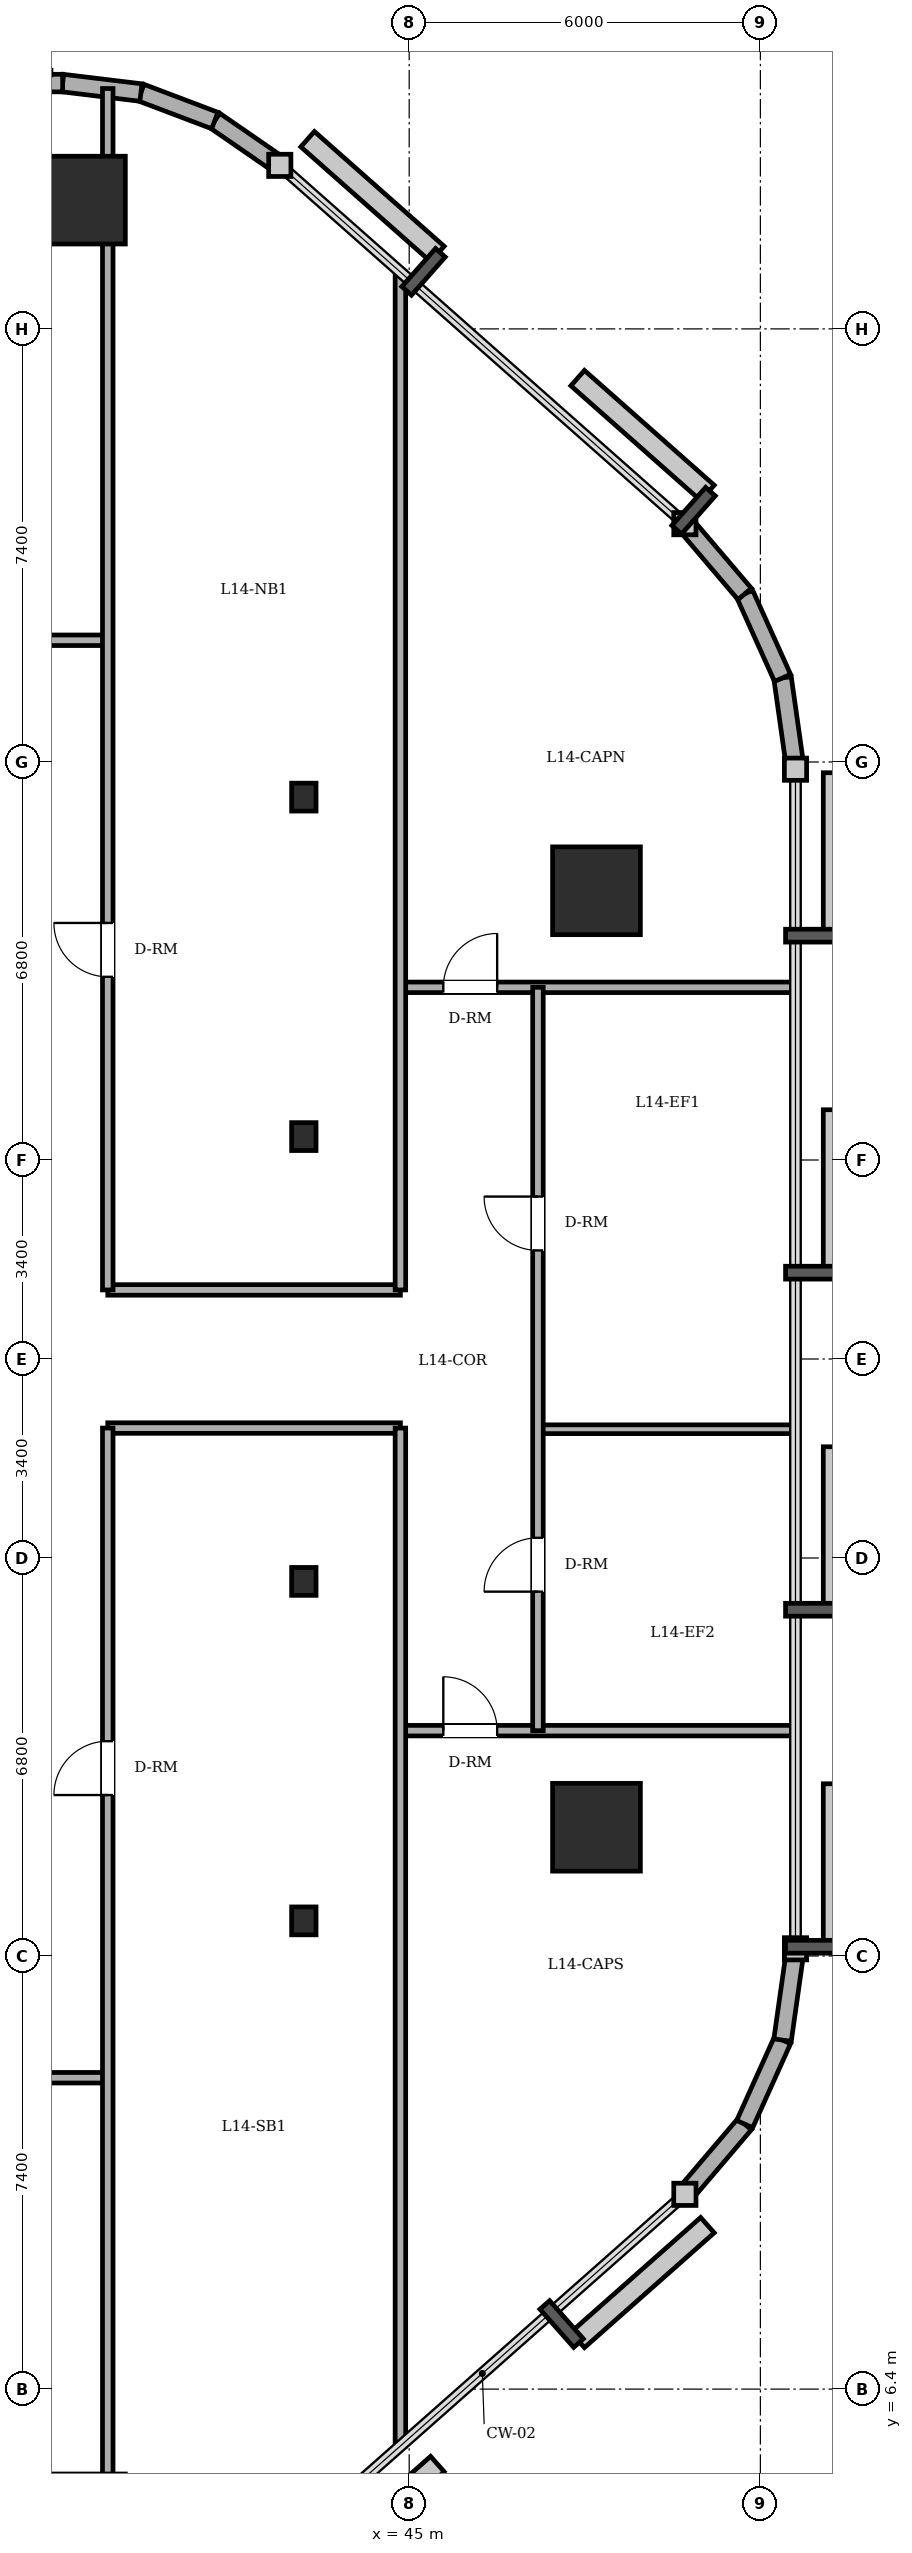
"""IFC4 building model, lengths in metres.
Left out: names, types, materials, properties, quantities, classifications, styles, units other than length and angle.
Written with IfcOpenShell. Run it as: python <this file> out.ifc"""

import sys

from ifc_helpers import new_model, si_unit, direction, frame, frame_2d, origin, origin_2d, place, context, subcontext, project, spatial, rectangle, circle, i_section, extrude, element, fill, save


model = new_model("IFC4")
c1 = context("Model", 3, precision=1e-05, world=origin(), true_north=direction((0.0, 1.0)))
c2 = subcontext(c1, "Body", "Model", "MODEL_VIEW")
j1 = project(units=[si_unit("LENGTHUNIT", "METRE"), si_unit("PLANEANGLEUNIT", "RADIAN")], contexts=[c1])
p1 = place(None, origin())
s1 = spatial("IfcSite", under=j1, at=p1, CompositionType="ELEMENT")
p2 = place(p1, origin())
s2 = spatial("IfcBuilding", under=s1, at=p2, CompositionType="ELEMENT")
p3 = place(p2, frame((0.0, 0.0, 54.0)))
s3 = spatial("IfcBuildingStorey", under=s2, at=p3, CompositionType="ELEMENT", Elevation=54.0)
for number, where, z_axis, x_axis in (
    (1, (48.2, 16.0, 0.0), (0.0, 0.0, 1.0), (1.0, 0.0, 0.0)),
    (2, (48.2, 32.0, 0.0), (0.0, 0.0, 1.0), (1.0, 0.0, 0.0)),
    (3, (39.4, 43.8, 0.0), (0.0, 0.0, 1.0), (1.0, 0.0, 0.0)),
):
    element("IfcColumn", number, at=place(p3, frame(where, z_axis=z_axis, x_axis=x_axis)), inside=s3, PredefinedType="COLUMN", context=c2, shape_type="SweptSolid", body=[
        extrude(circle(Radius=0.75, at=origin_2d()), origin(), (0.0, 0.0, 1.0), 3.6),
    ])
for number, where, z_axis, x_axis in (
    (4, (43.2, 14.4, 0.0), (0.0, 0.0, 1.0), (1.0, 0.0, 0.0)),
    (5, (43.2, 20.2, 0.0), (0.0, 0.0, 1.0), (1.0, 0.0, 0.0)),
    (6, (43.2, 27.8, 0.0), (0.0, 0.0, 1.0), (1.0, 0.0, 0.0)),
    (7, (43.2, 33.6, 0.0), (0.0, 0.0, 1.0), (1.0, 0.0, 0.0)),
):
    element("IfcColumn", number, at=place(p3, frame(where, z_axis=z_axis, x_axis=x_axis)), inside=s3, PredefinedType="COLUMN", context=c2, shape_type="SweptSolid", body=[
        extrude(i_section(OverallWidth=0.417, OverallDepth=0.477, WebThickness=0.036, FlangeThickness=0.057, FilletRadius=0.015, at=origin_2d()), origin(), (0.0, 0.0, 1.0), 3.6),
    ])
p4 = place(p3, frame((49.71, 9.728, 0.0), z_axis=(0.0, 0.0, 1.0), x_axis=(0.648389989909, 0.7613083613, 0.0)))
e8 = element("IfcWall", 8, at=p4, inside=s3, PredefinedType="SOLIDWALL", context=c2, shape_type="SweptSolid", body=[
    extrude(rectangle(XDim=1.576, YDim=0.3, at=frame_2d((0.788, 0.0))), origin(), (0.0, 0.0, 1.0), 3.4),
])
p5 = place(p3, frame((50.732, 10.928, 0.0), z_axis=(0.0, 0.0, 1.0), x_axis=(0.410996558744, 0.911636895206, 0.0)))
e9 = element("IfcWall", 9, at=p5, inside=s3, PredefinedType="SOLIDWALL", context=c2, shape_type="SweptSolid", body=[
    extrude(rectangle(XDim=1.574, YDim=0.3, at=frame_2d((0.787, 0.0))), origin(), (0.0, 0.0, 1.0), 3.4),
])
for number, where, z_axis, x_axis in (
    (10, (51.379, 12.363, 0.0), (0.0, 0.0, 1.0), (0.14, 0.99, 0.0)),
    (11, (51.6, 34.077, 0.0), (0.0, 0.0, 1.0), (-0.14, 0.99, 0.0)),
):
    element("IfcWall", number, at=place(p3, frame(where, z_axis=z_axis, x_axis=x_axis)), inside=s3, PredefinedType="SOLIDWALL", context=c2, shape_type="SweptSolid", body=[
        extrude(rectangle(XDim=1.576, YDim=0.3, at=frame_2d((0.788, 0.0))), origin(), (0.0, 0.0, 1.0), 3.4),
    ])
p6 = place(p3, frame((51.379, 35.637, 0.0), z_axis=(0.0, 0.0, 1.0), x_axis=(-0.410996558744, 0.911636895206, 0.0)))
e12 = element("IfcWall", 12, at=p6, inside=s3, PredefinedType="SOLIDWALL", context=c2, shape_type="SweptSolid", body=[
    extrude(rectangle(XDim=1.574, YDim=0.3, at=frame_2d((0.787, 0.0))), origin(), (0.0, 0.0, 1.0), 3.4),
])
p7 = place(p3, frame((50.732, 37.072, 0.0), z_axis=(0.0, 0.0, 1.0), x_axis=(-0.648389989909, 0.7613083613, 0.0)))
e13 = element("IfcWall", 13, at=p7, inside=s3, PredefinedType="SOLIDWALL", context=c2, shape_type="SweptSolid", body=[
    extrude(rectangle(XDim=1.576, YDim=0.3, at=frame_2d((0.788, 0.0))), origin(), (0.0, 0.0, 1.0), 3.4),
])
p8 = place(p3, frame((42.789, 44.394, 0.0), z_axis=(0.0, 0.0, 1.0), x_axis=(-0.823116500192, 0.567872544777, 0.0)))
e14 = element("IfcWall", 14, at=p8, inside=s3, PredefinedType="SOLIDWALL", context=c2, shape_type="SweptSolid", body=[
    extrude(rectangle(XDim=1.349, YDim=0.3, at=frame_2d((0.674, 0.0))), origin(), (0.0, 0.0, 1.0), 3.4),
])
p9 = place(p3, frame((41.679, 45.16, 0.0), z_axis=(0.0, 0.0, 1.0), x_axis=(-0.935156721165, 0.354234254216, 0.0)))
e15 = element("IfcWall", 15, at=p9, inside=s3, PredefinedType="SOLIDWALL", context=c2, shape_type="SweptSolid", body=[
    extrude(rectangle(XDim=1.349, YDim=0.3, at=frame_2d((0.675, 0.0))), origin(), (0.0, 0.0, 1.0), 3.4),
])
p10 = place(p3, frame((40.417, 45.638, 0.0), z_axis=(0.0, 0.0, 1.0), x_axis=(-0.992739027259, 0.120288086515, 0.0)))
e16 = element("IfcWall", 16, at=p10, inside=s3, PredefinedType="SOLIDWALL", context=c2, shape_type="SweptSolid", body=[
    extrude(rectangle(XDim=1.348, YDim=0.3, at=frame_2d((0.674, 0.0))), origin(), (0.0, 0.0, 1.0), 3.4),
])
p11 = place(p3, frame((39.079, 45.8, 0.0), z_axis=(0.0, 0.0, 1.0), x_axis=(-1.0, 0.0, 0.0)))
e17 = element("IfcWall", 17, at=p11, inside=s3, PredefinedType="SOLIDWALL", context=c2, shape_type="SweptSolid", body=[
    extrude(rectangle(XDim=30.079, YDim=0.3, at=frame_2d((15.04, 0.0))), origin(), (0.0, 0.0, 1.0), 3.4),
])
p12 = place(p11, frame((23.904, 0.0, 0.0)))
e18 = element("IfcOpeningElement", 18, at=p12, cuts=e17, PredefinedType="OPENING", context=c2, shape_type="SweptSolid", body=[
    extrude(rectangle(XDim=0.95, YDim=2.2, at=frame_2d((0.475, 1.1))), frame((0.0, 0.16, 0.0), z_axis=(0.0, -1.0, 0.0), x_axis=(1.0, 0.0, 0.0)), (0.0, 0.0, 1.0), 0.32),
])
p13 = place(p11, frame((2.226, 0.0, 0.85)))
e19 = element("IfcOpeningElement", 19, at=p13, cuts=e17, PredefinedType="OPENING", context=c2, shape_type="SweptSolid", body=[
    extrude(rectangle(XDim=1.8, YDim=1.55, at=frame_2d((0.9, 0.775))), frame((0.0, 0.16, 0.0), z_axis=(0.0, -1.0, 0.0), x_axis=(1.0, 0.0, 0.0)), (0.0, 0.0, 1.0), 0.32),
])
p14 = place(p11, frame((5.003, 0.0, 0.85)))
e20 = element("IfcOpeningElement", 20, at=p14, cuts=e17, PredefinedType="OPENING", context=c2, shape_type="SweptSolid", body=[
    extrude(rectangle(XDim=1.8, YDim=1.55, at=frame_2d((0.9, 0.775))), frame((0.0, 0.16, 0.0), z_axis=(0.0, -1.0, 0.0), x_axis=(1.0, 0.0, 0.0)), (0.0, 0.0, 1.0), 0.32),
])
p15 = place(p11, frame((10.179, 0.0, 0.85)))
e21 = element("IfcOpeningElement", 21, at=p15, cuts=e17, PredefinedType="OPENING", context=c2, shape_type="SweptSolid", body=[
    extrude(rectangle(XDim=1.8, YDim=1.55, at=frame_2d((0.9, 0.775))), frame((0.0, 0.16, 0.0), z_axis=(0.0, -1.0, 0.0), x_axis=(1.0, 0.0, 0.0)), (0.0, 0.0, 1.0), 0.32),
])
p16 = place(p11, frame((12.579, 0.0, 0.85)))
e22 = element("IfcOpeningElement", 22, at=p16, cuts=e17, PredefinedType="OPENING", context=c2, shape_type="SweptSolid", body=[
    extrude(rectangle(XDim=1.8, YDim=1.55, at=frame_2d((0.9, 0.775))), frame((0.0, 0.16, 0.0), z_axis=(0.0, -1.0, 0.0), x_axis=(1.0, 0.0, 0.0)), (0.0, 0.0, 1.0), 0.32),
])
p17 = place(p11, frame((19.596, 0.0, 0.85)))
e23 = element("IfcOpeningElement", 23, at=p17, cuts=e17, PredefinedType="OPENING", context=c2, shape_type="SweptSolid", body=[
    extrude(rectangle(XDim=1.8, YDim=1.55, at=frame_2d((0.9, 0.775))), frame((0.0, 0.16, 0.0), z_axis=(0.0, -1.0, 0.0), x_axis=(1.0, 0.0, 0.0)), (0.0, 0.0, 1.0), 0.32),
])
p18 = place(p3, frame((3.4, 11.72, 0.0), z_axis=(0.0, 0.0, 1.0), x_axis=(1.0, 0.0, 0.0)))
e24 = element("IfcWall", 24, at=p18, inside=s3, PredefinedType="PARTITIONING", context=c2, shape_type="SweptSolid", body=[
    extrude(rectangle(XDim=36.45, YDim=0.18, at=frame_2d((18.225, 0.0))), origin(), (0.0, 0.0, 1.0), 3.4),
])
p19 = place(p18, frame((21.24, 0.0, 0.0)))
e25 = element("IfcOpeningElement", 25, at=p19, cuts=e24, PredefinedType="OPENING", context=c2, shape_type="SweptSolid", body=[
    extrude(rectangle(XDim=0.92, YDim=2.1, at=frame_2d((0.46, 1.05))), frame((0.0, 0.1, 0.0), z_axis=(0.0, -1.0, 0.0), x_axis=(1.0, 0.0, 0.0)), (0.0, 0.0, 1.0), 0.2),
])
p20 = place(p18, frame((10.7, 0.0, 0.0)))
e26 = element("IfcOpeningElement", 26, at=p20, cuts=e24, PredefinedType="OPENING", context=c2, shape_type="SweptSolid", body=[
    extrude(rectangle(XDim=1.0, YDim=2.15, at=frame_2d((0.5, 1.075))), frame((0.0, 0.1, 0.0), z_axis=(0.0, -1.0, 0.0), x_axis=(1.0, 0.0, 0.0)), (0.0, 0.0, 1.0), 0.2),
])
p21 = place(p18, frame((29.305, 0.0, 0.0)))
e27 = element("IfcOpeningElement", 27, at=p21, cuts=e24, PredefinedType="OPENING", context=c2, shape_type="SweptSolid", body=[
    extrude(rectangle(XDim=0.92, YDim=2.1, at=frame_2d((0.46, 1.05))), frame((0.0, 0.1, 0.0), z_axis=(0.0, -1.0, 0.0), x_axis=(1.0, 0.0, 0.0)), (0.0, 0.0, 1.0), 0.2),
])
p22 = place(p3, frame((44.85, 17.65, 0.0), z_axis=(0.0, 0.0, 1.0), x_axis=(1.0, 0.0, 0.0)))
e28 = element("IfcWall", 28, at=p22, inside=s3, PredefinedType="PARTITIONING", context=c2, shape_type="SweptSolid", body=[
    extrude(rectangle(XDim=6.75, YDim=0.18, at=frame_2d((3.375, 0.0))), origin(), (0.0, 0.0, 1.0), 3.4),
])
p23 = place(p22, frame((0.733, 0.0, 0.0)))
e29 = element("IfcOpeningElement", 29, at=p23, cuts=e28, PredefinedType="OPENING", context=c2, shape_type="SweptSolid", body=[
    extrude(rectangle(XDim=0.92, YDim=2.1, at=frame_2d((0.46, 1.05))), frame((0.0, 0.1, 0.0), z_axis=(0.0, -1.0, 0.0), x_axis=(1.0, 0.0, 0.0)), (0.0, 0.0, 1.0), 0.2),
])
p24 = place(p3, frame((39.85, 22.82, 0.0), z_axis=(0.0, 0.0, 1.0), x_axis=(1.0, 0.0, 0.0)))
e30 = element("IfcWall", 30, at=p24, inside=s3, PredefinedType="PARTITIONING", context=c2, shape_type="SweptSolid", body=[
    extrude(rectangle(XDim=5.0, YDim=0.18, at=frame_2d((2.5, 0.0))), origin(), (0.0, 0.0, 1.0), 3.4),
])
p25 = place(p3, frame((47.2, 22.8, 0.0), z_axis=(0.0, 0.0, 1.0), x_axis=(1.0, 0.0, 0.0)))
e31 = element("IfcWall", 31, at=p25, inside=s3, PredefinedType="PARTITIONING", context=c2, shape_type="SweptSolid", body=[
    extrude(rectangle(XDim=4.4, YDim=0.15, at=frame_2d((2.2, 0.0))), origin(), (0.0, 0.0, 1.0), 3.4),
])
p26 = place(p3, frame((39.85, 25.18, 0.0), z_axis=(0.0, 0.0, 1.0), x_axis=(1.0, 0.0, 0.0)))
e32 = element("IfcWall", 32, at=p26, inside=s3, PredefinedType="PARTITIONING", context=c2, shape_type="SweptSolid", body=[
    extrude(rectangle(XDim=5.0, YDim=0.18, at=frame_2d((2.5, 0.0))), origin(), (0.0, 0.0, 1.0), 3.4),
])
p27 = place(p3, frame((44.85, 30.35, 0.0), z_axis=(0.0, 0.0, 1.0), x_axis=(1.0, 0.0, 0.0)))
e33 = element("IfcWall", 33, at=p27, inside=s3, PredefinedType="PARTITIONING", context=c2, shape_type="SweptSolid", body=[
    extrude(rectangle(XDim=6.75, YDim=0.18, at=frame_2d((3.375, 0.0))), origin(), (0.0, 0.0, 1.0), 3.4),
])
p28 = place(p27, frame((0.733, 0.0, 0.0)))
e34 = element("IfcOpeningElement", 34, at=p28, cuts=e33, PredefinedType="OPENING", context=c2, shape_type="SweptSolid", body=[
    extrude(rectangle(XDim=0.92, YDim=2.1, at=frame_2d((0.46, 1.05))), frame((0.0, 0.1, 0.0), z_axis=(0.0, -1.0, 0.0), x_axis=(1.0, 0.0, 0.0)), (0.0, 0.0, 1.0), 0.2),
])
p29 = place(p3, frame((3.4, 36.28, 0.0), z_axis=(0.0, 0.0, 1.0), x_axis=(1.0, 0.0, 0.0)))
e35 = element("IfcWall", 35, at=p29, inside=s3, PredefinedType="PARTITIONING", context=c2, shape_type="SweptSolid", body=[
    extrude(rectangle(XDim=36.45, YDim=0.18, at=frame_2d((18.225, 0.0))), origin(), (0.0, 0.0, 1.0), 3.4),
])
p30 = place(p29, frame((21.05, 0.0, 0.0)))
e36 = element("IfcOpeningElement", 36, at=p30, cuts=e35, PredefinedType="OPENING", context=c2, shape_type="SweptSolid", body=[
    extrude(rectangle(XDim=0.9, YDim=2.1, at=frame_2d((0.45, 1.05))), frame((0.0, 0.1, 0.0), z_axis=(0.0, -1.0, 0.0), x_axis=(1.0, 0.0, 0.0)), (0.0, 0.0, 1.0), 0.2),
])
p31 = place(p29, frame((24.67, 0.0, 0.0)))
e37 = element("IfcOpeningElement", 37, at=p31, cuts=e35, PredefinedType="OPENING", context=c2, shape_type="SweptSolid", body=[
    extrude(rectangle(XDim=0.86, YDim=2.1, at=frame_2d((0.43, 1.05))), frame((0.0, 0.1, 0.0), z_axis=(0.0, -1.0, 0.0), x_axis=(1.0, 0.0, 0.0)), (0.0, 0.0, 1.0), 0.2),
])
p32 = place(p29, frame((10.7, 0.0, 0.0)))
e38 = element("IfcOpeningElement", 38, at=p32, cuts=e35, PredefinedType="OPENING", context=c2, shape_type="SweptSolid", body=[
    extrude(rectangle(XDim=1.0, YDim=2.15, at=frame_2d((0.5, 1.075))), frame((0.0, 0.1, 0.0), z_axis=(0.0, -1.0, 0.0), x_axis=(1.0, 0.0, 0.0)), (0.0, 0.0, 1.0), 0.2),
])
p33 = place(p29, frame((30.965, 0.0, 0.0)))
e39 = element("IfcOpeningElement", 39, at=p33, cuts=e35, PredefinedType="OPENING", context=c2, shape_type="SweptSolid", body=[
    extrude(rectangle(XDim=1.0, YDim=2.15, at=frame_2d((0.5, 1.075))), frame((0.0, 0.1, 0.0), z_axis=(0.0, -1.0, 0.0), x_axis=(1.0, 0.0, 0.0)), (0.0, 0.0, 1.0), 0.2),
])
p34 = place(p3, frame((39.85, 2.293, 0.0), z_axis=(0.0, 0.0, 1.0), x_axis=(0.0, 1.0, 0.0)))
e40 = element("IfcWall", 40, at=p34, inside=s3, PredefinedType="PARTITIONING", context=c2, shape_type="SweptSolid", body=[
    extrude(rectangle(XDim=20.527, YDim=0.18, at=frame_2d((10.264, 0.0))), origin(), (0.0, 0.0, 1.0), 2.782),
])
p35 = place(p34, frame((14.257, 0.0, 0.0)))
e41 = element("IfcOpeningElement", 41, at=p35, cuts=e40, PredefinedType="OPENING", context=c2, shape_type="SweptSolid", body=[
    extrude(rectangle(XDim=0.92, YDim=2.1, at=frame_2d((0.46, 1.05))), frame((0.0, 0.1, 0.0), z_axis=(0.0, -1.0, 0.0), x_axis=(1.0, 0.0, 0.0)), (0.0, 0.0, 1.0), 0.2),
])
p36 = place(p3, frame((39.85, 25.18, 0.0), z_axis=(0.0, 0.0, 1.0), x_axis=(0.0, 1.0, 0.0)))
e42 = element("IfcWall", 42, at=p36, inside=s3, PredefinedType="PARTITIONING", context=c2, shape_type="SweptSolid", body=[
    extrude(rectangle(XDim=20.527, YDim=0.18, at=frame_2d((10.264, 0.0))), origin(), (0.0, 0.0, 1.0), 2.782),
])
p37 = place(p36, frame((5.35, 0.0, 0.0)))
e43 = element("IfcOpeningElement", 43, at=p37, cuts=e42, PredefinedType="OPENING", context=c2, shape_type="SweptSolid", body=[
    extrude(rectangle(XDim=0.92, YDim=2.1, at=frame_2d((0.46, 1.05))), frame((0.0, 0.1, 0.0), z_axis=(0.0, -1.0, 0.0), x_axis=(1.0, 0.0, 0.0)), (0.0, 0.0, 1.0), 0.2),
])
for number, where, z_axis, x_axis in (
    (44, (44.85, 5.429, 0.0), (0.0, 0.0, 1.0), (0.0, 1.0, 0.0)),
    (45, (44.85, 25.18, 0.0), (0.0, 0.0, 1.0), (0.0, 1.0, 0.0)),
):
    element("IfcWall", number, at=place(p3, frame(where, z_axis=z_axis, x_axis=x_axis)), inside=s3, PredefinedType="PARTITIONING", context=c2, shape_type="SweptSolid", body=[
        extrude(rectangle(XDim=17.391, YDim=0.18, at=frame_2d((8.696, 0.0))), origin(), (0.0, 0.0, 1.0), 3.4),
    ])
p38 = place(p3, frame((47.2, 17.65, 0.0), z_axis=(0.0, 0.0, 1.0), x_axis=(0.0, 1.0, 0.0)))
e46 = element("IfcWall", 46, at=p38, inside=s3, PredefinedType="PARTITIONING", context=c2, shape_type="SweptSolid", body=[
    extrude(rectangle(XDim=12.7, YDim=0.18, at=frame_2d((6.35, 0.0))), origin(), (0.0, 0.0, 1.0), 3.4),
])
p39 = place(p38, frame((8.205, 0.0, 0.0)))
e47 = element("IfcOpeningElement", 47, at=p39, cuts=e46, PredefinedType="OPENING", context=c2, shape_type="SweptSolid", body=[
    extrude(rectangle(XDim=0.92, YDim=2.1, at=frame_2d((0.46, 1.05))), frame((0.0, 0.1, 0.0), z_axis=(0.0, -1.0, 0.0), x_axis=(1.0, 0.0, 0.0)), (0.0, 0.0, 1.0), 0.2),
])
p40 = place(p38, frame((2.375, 0.0, 0.0)))
e48 = element("IfcOpeningElement", 48, at=p40, cuts=e46, PredefinedType="OPENING", context=c2, shape_type="SweptSolid", body=[
    extrude(rectangle(XDim=0.92, YDim=2.1, at=frame_2d((0.46, 1.05))), frame((0.0, 0.1, 0.0), z_axis=(0.0, -1.0, 0.0), x_axis=(1.0, 0.0, 0.0)), (0.0, 0.0, 1.0), 0.2),
])
p41 = place(p37, origin())
e49 = element("IfcDoor", 49, at=p41, inside=s3, OperationType="SINGLE_SWING_RIGHT", PredefinedType="DOOR", context=c2, shape_type="SweptSolid", body=[
    extrude(rectangle(XDim=0.92, YDim=2.1, at=frame_2d((0.46, 1.05))), frame((0.0, 0.025, 0.0), z_axis=(0.0, -1.0, 0.0), x_axis=(1.0, 0.0, 0.0)), (0.0, 0.0, 1.0), 0.05),
])
fill(e43, e49)
p42 = place(p35, origin())
e50 = element("IfcDoor", 50, at=p42, inside=s3, OperationType="SINGLE_SWING_LEFT", PredefinedType="DOOR", context=c2, shape_type="SweptSolid", body=[
    extrude(rectangle(XDim=0.92, YDim=2.1, at=frame_2d((0.46, 1.05))), frame((0.0, 0.025, 0.0), z_axis=(0.0, -1.0, 0.0), x_axis=(1.0, 0.0, 0.0)), (0.0, 0.0, 1.0), 0.05),
])
fill(e41, e50)
p43 = place(p28, origin())
e51 = element("IfcDoor", 51, at=p43, inside=s3, OperationType="SINGLE_SWING_RIGHT", PredefinedType="DOOR", context=c2, shape_type="SweptSolid", body=[
    extrude(rectangle(XDim=0.92, YDim=2.1, at=frame_2d((0.46, 1.05))), frame((0.0, 0.025, 0.0), z_axis=(0.0, -1.0, 0.0), x_axis=(1.0, 0.0, 0.0)), (0.0, 0.0, 1.0), 0.05),
])
fill(e34, e51)
p44 = place(p23, origin())
e52 = element("IfcDoor", 52, at=p44, inside=s3, OperationType="SINGLE_SWING_LEFT", PredefinedType="DOOR", context=c2, shape_type="SweptSolid", body=[
    extrude(rectangle(XDim=0.92, YDim=2.1, at=frame_2d((0.46, 1.05))), frame((0.0, 0.025, 0.0), z_axis=(0.0, -1.0, 0.0), x_axis=(1.0, 0.0, 0.0)), (0.0, 0.0, 1.0), 0.05),
])
fill(e29, e52)
p45 = place(p39, origin())
e53 = element("IfcDoor", 53, at=p45, inside=s3, OperationType="SINGLE_SWING_RIGHT", PredefinedType="DOOR", context=c2, shape_type="SweptSolid", body=[
    extrude(rectangle(XDim=0.92, YDim=2.1, at=frame_2d((0.46, 1.05))), frame((0.0, 0.025, 0.0), z_axis=(0.0, -1.0, 0.0), x_axis=(1.0, 0.0, 0.0)), (0.0, 0.0, 1.0), 0.05),
])
fill(e47, e53)
p46 = place(p40, origin())
e54 = element("IfcDoor", 54, at=p46, inside=s3, OperationType="SINGLE_SWING_LEFT", PredefinedType="DOOR", context=c2, shape_type="SweptSolid", body=[
    extrude(rectangle(XDim=0.92, YDim=2.1, at=frame_2d((0.46, 1.05))), frame((0.0, 0.025, 0.0), z_axis=(0.0, -1.0, 0.0), x_axis=(1.0, 0.0, 0.0)), (0.0, 0.0, 1.0), 0.05),
])
fill(e48, e54)
save(model, sys.argv[1])
